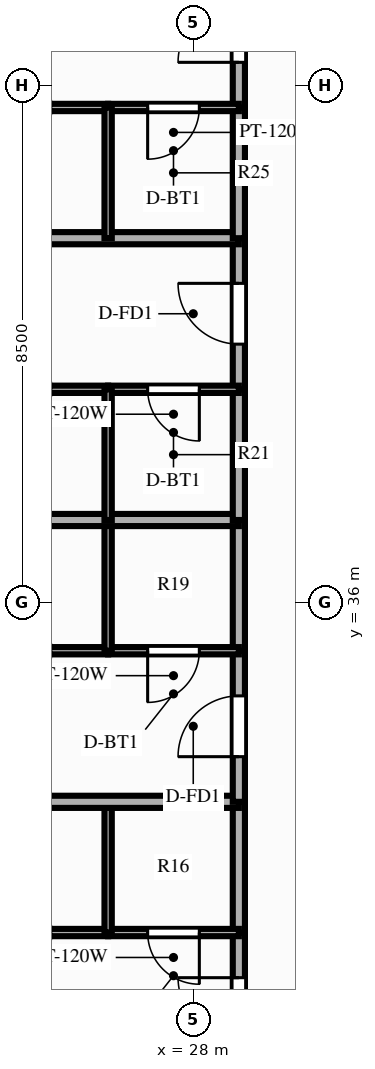
"""IFC4 building model, lengths in metres.
Left out: names, types, materials, properties, quantities, classifications, styles, units other than length and angle.
Written with IfcOpenShell. Run it as: python <this file> out.ifc"""

import sys

from ifc_helpers import new_model, si_unit, direction, frame, frame_2d, origin, place, context, subcontext, project, spatial, rectangle, extrude, source, transform, mapped, element, fill, save


model = new_model("IFC4")
c1 = context("Model", 3, precision=1e-05, world=origin(), true_north=direction((0.0, 1.0)))
c2 = subcontext(c1, "Body", "Model", "MODEL_VIEW")
j1 = project(units=[si_unit("LENGTHUNIT", "METRE"), si_unit("PLANEANGLEUNIT", "RADIAN")], contexts=[c1])
p1 = place(None, origin())
s1 = spatial("IfcSite", under=j1, at=p1, CompositionType="ELEMENT")
p2 = place(p1, origin())
s2 = spatial("IfcBuilding", under=s1, at=p2, CompositionType="ELEMENT")
p3 = place(p2, frame((0.0, 0.0, 122.85)))
s3 = spatial("IfcBuildingStorey", under=s2, at=p3, CompositionType="ELEMENT", Elevation=122.85)
p4 = place(p3, frame((28.75, 28.08, 0.0), z_axis=(0.0, 0.0, 1.0), x_axis=(0.0, 1.0, 0.0)))
e1 = element("IfcWall", 1, at=p4, inside=s3, PredefinedType="PARTITIONING", context=c2, shape_type="SweptSolid", body=[
    extrude(rectangle(XDim=2.485, YDim=0.2, at=frame_2d((1.242, 0.0))), origin(), (0.0, 0.0, 1.0), 3.56),
])
p5 = place(p4, frame((0.742, 0.0, 0.0)))
e2 = element("IfcOpeningElement", 2, at=p5, cuts=e1, PredefinedType="OPENING", context=c2, shape_type="SweptSolid", body=[
    extrude(rectangle(XDim=1.0, YDim=2.15, at=frame_2d((0.5, 1.075))), frame((0.0, 0.112, 0.0), z_axis=(0.0, -1.0, 0.0), x_axis=(1.0, 0.0, 0.0)), (0.0, 0.0, 1.0), 0.224),
])
p6 = place(p3, frame((28.75, 30.565, 0.0), z_axis=(0.0, 0.0, 1.0), x_axis=(0.0, 1.0, 0.0)))
e3 = element("IfcWall", 3, at=p6, inside=s3, PredefinedType="PARTITIONING", context=c2, shape_type="SweptSolid", body=[
    extrude(rectangle(XDim=2.15, YDim=0.2, at=frame_2d((1.075, 0.0))), origin(), (0.0, 0.0, 1.0), 3.56),
])
p7 = place(p3, frame((28.75, 30.565, 0.0), z_axis=(0.0, 0.0, 1.0), x_axis=(-1.0, 0.0, 0.0)))
e4 = element("IfcWall", 4, at=p7, inside=s3, PredefinedType="PARTITIONING", context=c2, shape_type="SweptSolid", body=[
    extrude(rectangle(XDim=2.15, YDim=0.12, at=frame_2d((1.075, 0.0))), origin(), (0.0, 0.0, 1.0), 3.56),
])
p8 = place(p7, frame((0.65, 0.0, 0.0)))
e5 = element("IfcOpeningElement", 5, at=p8, cuts=e4, PredefinedType="OPENING", context=c2, shape_type="SweptSolid", body=[
    extrude(rectangle(XDim=0.85, YDim=2.05, at=frame_2d((0.425, 1.025))), frame((0.0, 0.072, 0.0), z_axis=(0.0, -1.0, 0.0), x_axis=(1.0, 0.0, 0.0)), (0.0, 0.0, 1.0), 0.144),
])
p9 = place(p3, frame((26.6, 30.565, 0.0), z_axis=(0.0, 0.0, 1.0), x_axis=(-1.0, 0.0, 0.0)))
e6 = element("IfcWall", 6, at=p9, inside=s3, PredefinedType="PARTITIONING", context=c2, shape_type="SweptSolid", body=[
    extrude(rectangle(XDim=0.97, YDim=0.12, at=frame_2d((0.485, 0.0))), origin(), (0.0, 0.0, 1.0), 3.56),
])
p10 = place(p3, frame((26.6, 30.565, 0.0), z_axis=(0.0, 0.0, 1.0), x_axis=(0.0, 1.0, 0.0)))
e7 = element("IfcWall", 7, at=p10, inside=s3, PredefinedType="PARTITIONING", context=c2, shape_type="SweptSolid", body=[
    extrude(rectangle(XDim=2.15, YDim=0.12, at=frame_2d((1.075, 0.0))), origin(), (0.0, 0.0, 1.0), 3.56),
])
p11 = place(p3, frame((28.75, 32.715, 0.0), z_axis=(0.0, 0.0, 1.0), x_axis=(-1.0, 0.0, 0.0)))
e8 = element("IfcWall", 8, at=p11, inside=s3, PredefinedType="PARTITIONING", context=c2, shape_type="SweptSolid", body=[
    extrude(rectangle(XDim=16.6, YDim=0.2, at=frame_2d((8.3, 0.0))), origin(), (0.0, 0.0, 1.0), 3.56),
])
p12 = place(p3, frame((28.75, 32.715, 0.0), z_axis=(0.0, 0.0, 1.0), x_axis=(0.0, 1.0, 0.0)))
e9 = element("IfcWall", 9, at=p12, inside=s3, PredefinedType="PARTITIONING", context=c2, shape_type="SweptSolid", body=[
    extrude(rectangle(XDim=2.485, YDim=0.2, at=frame_2d((1.242, 0.0))), origin(), (0.0, 0.0, 1.0), 3.56),
])
p13 = place(p12, frame((0.742, 0.0, 0.0)))
e10 = element("IfcOpeningElement", 10, at=p13, cuts=e9, PredefinedType="OPENING", context=c2, shape_type="SweptSolid", body=[
    extrude(rectangle(XDim=1.0, YDim=2.15, at=frame_2d((0.5, 1.075))), frame((0.0, 0.112, 0.0), z_axis=(0.0, -1.0, 0.0), x_axis=(1.0, 0.0, 0.0)), (0.0, 0.0, 1.0), 0.224),
])
p14 = place(p3, frame((28.75, 35.2, 0.0), z_axis=(0.0, 0.0, 1.0), x_axis=(0.0, 1.0, 0.0)))
e11 = element("IfcWall", 11, at=p14, inside=s3, PredefinedType="PARTITIONING", context=c2, shape_type="SweptSolid", body=[
    extrude(rectangle(XDim=2.15, YDim=0.2, at=frame_2d((1.075, 0.0))), origin(), (0.0, 0.0, 1.0), 3.56),
])
p15 = place(p3, frame((28.75, 35.2, 0.0), z_axis=(0.0, 0.0, 1.0), x_axis=(-1.0, 0.0, 0.0)))
e12 = element("IfcWall", 12, at=p15, inside=s3, PredefinedType="PARTITIONING", context=c2, shape_type="SweptSolid", body=[
    extrude(rectangle(XDim=2.15, YDim=0.12, at=frame_2d((1.075, 0.0))), origin(), (0.0, 0.0, 1.0), 3.56),
])
p16 = place(p15, frame((0.65, 0.0, 0.0)))
e13 = element("IfcOpeningElement", 13, at=p16, cuts=e12, PredefinedType="OPENING", context=c2, shape_type="SweptSolid", body=[
    extrude(rectangle(XDim=0.85, YDim=2.05, at=frame_2d((0.425, 1.025))), frame((0.0, 0.072, 0.0), z_axis=(0.0, -1.0, 0.0), x_axis=(1.0, 0.0, 0.0)), (0.0, 0.0, 1.0), 0.144),
])
p17 = place(p3, frame((26.6, 35.2, 0.0), z_axis=(0.0, 0.0, 1.0), x_axis=(-1.0, 0.0, 0.0)))
e14 = element("IfcWall", 14, at=p17, inside=s3, PredefinedType="PARTITIONING", context=c2, shape_type="SweptSolid", body=[
    extrude(rectangle(XDim=0.97, YDim=0.12, at=frame_2d((0.485, 0.0))), origin(), (0.0, 0.0, 1.0), 3.56),
])
p18 = place(p3, frame((26.6, 35.2, 0.0), z_axis=(0.0, 0.0, 1.0), x_axis=(0.0, 1.0, 0.0)))
e15 = element("IfcWall", 15, at=p18, inside=s3, PredefinedType="PARTITIONING", context=c2, shape_type="SweptSolid", body=[
    extrude(rectangle(XDim=2.15, YDim=0.12, at=frame_2d((1.075, 0.0))), origin(), (0.0, 0.0, 1.0), 3.56),
])
p19 = place(p3, frame((28.75, 37.35, 0.0), z_axis=(0.0, 0.0, 1.0), x_axis=(-1.0, 0.0, 0.0)))
e16 = element("IfcWall", 16, at=p19, inside=s3, PredefinedType="PARTITIONING", context=c2, shape_type="SweptSolid", body=[
    extrude(rectangle(XDim=16.6, YDim=0.2, at=frame_2d((8.3, 0.0))), origin(), (0.0, 0.0, 1.0), 3.56),
])
p20 = place(p3, frame((28.75, 37.35, 0.0), z_axis=(0.0, 0.0, 1.0), x_axis=(0.0, 1.0, 0.0)))
e17 = element("IfcWall", 17, at=p20, inside=s3, PredefinedType="PARTITIONING", context=c2, shape_type="SweptSolid", body=[
    extrude(rectangle(XDim=2.15, YDim=0.2, at=frame_2d((1.075, 0.0))), origin(), (0.0, 0.0, 1.0), 3.56),
])
p21 = place(p3, frame((28.75, 39.5, 0.0), z_axis=(0.0, 0.0, 1.0), x_axis=(0.0, 1.0, 0.0)))
e18 = element("IfcWall", 18, at=p21, inside=s3, PredefinedType="PARTITIONING", context=c2, shape_type="SweptSolid", body=[
    extrude(rectangle(XDim=2.485, YDim=0.2, at=frame_2d((1.243, 0.0))), origin(), (0.0, 0.0, 1.0), 3.56),
])
p22 = place(p21, frame((0.742, 0.0, 0.0)))
e19 = element("IfcOpeningElement", 19, at=p22, cuts=e18, PredefinedType="OPENING", context=c2, shape_type="SweptSolid", body=[
    extrude(rectangle(XDim=1.0, YDim=2.15, at=frame_2d((0.5, 1.075))), frame((0.0, 0.112, 0.0), z_axis=(0.0, -1.0, 0.0), x_axis=(1.0, 0.0, 0.0)), (0.0, 0.0, 1.0), 0.224),
])
p23 = place(p3, frame((28.75, 39.5, 0.0), z_axis=(0.0, 0.0, 1.0), x_axis=(-1.0, 0.0, 0.0)))
e20 = element("IfcWall", 20, at=p23, inside=s3, PredefinedType="PARTITIONING", context=c2, shape_type="SweptSolid", body=[
    extrude(rectangle(XDim=2.15, YDim=0.12, at=frame_2d((1.075, 0.0))), origin(), (0.0, 0.0, 1.0), 3.56),
])
p24 = place(p23, frame((0.65, 0.0, 0.0)))
e21 = element("IfcOpeningElement", 21, at=p24, cuts=e20, PredefinedType="OPENING", context=c2, shape_type="SweptSolid", body=[
    extrude(rectangle(XDim=0.85, YDim=2.05, at=frame_2d((0.425, 1.025))), frame((0.0, 0.072, 0.0), z_axis=(0.0, -1.0, 0.0), x_axis=(1.0, 0.0, 0.0)), (0.0, 0.0, 1.0), 0.144),
])
p25 = place(p3, frame((26.6, 39.5, 0.0), z_axis=(0.0, 0.0, 1.0), x_axis=(-1.0, 0.0, 0.0)))
e22 = element("IfcWall", 22, at=p25, inside=s3, PredefinedType="PARTITIONING", context=c2, shape_type="SweptSolid", body=[
    extrude(rectangle(XDim=0.97, YDim=0.12, at=frame_2d((0.485, 0.0))), origin(), (0.0, 0.0, 1.0), 3.56),
])
p26 = place(p3, frame((26.6, 37.35, 0.0), z_axis=(0.0, 0.0, 1.0), x_axis=(0.0, 1.0, 0.0)))
e23 = element("IfcWall", 23, at=p26, inside=s3, PredefinedType="PARTITIONING", context=c2, shape_type="SweptSolid", body=[
    extrude(rectangle(XDim=2.15, YDim=0.12, at=frame_2d((1.075, 0.0))), origin(), (0.0, 0.0, 1.0), 3.56),
])
p27 = place(p3, frame((28.75, 41.985, 0.0), z_axis=(0.0, 0.0, 1.0), x_axis=(-1.0, 0.0, 0.0)))
e24 = element("IfcWall", 24, at=p27, inside=s3, PredefinedType="PARTITIONING", context=c2, shape_type="SweptSolid", body=[
    extrude(rectangle(XDim=16.6, YDim=0.2, at=frame_2d((8.3, 0.0))), origin(), (0.0, 0.0, 1.0), 3.56),
])
p28 = place(p3, frame((28.75, 41.985, 0.0), z_axis=(0.0, 0.0, 1.0), x_axis=(0.0, 1.0, 0.0)))
e25 = element("IfcWall", 25, at=p28, inside=s3, PredefinedType="PARTITIONING", context=c2, shape_type="SweptSolid", body=[
    extrude(rectangle(XDim=2.15, YDim=0.2, at=frame_2d((1.075, 0.0))), origin(), (0.0, 0.0, 1.0), 3.56),
])
p29 = place(p3, frame((28.75, 44.135, 0.0), z_axis=(0.0, 0.0, 1.0), x_axis=(0.0, 1.0, 0.0)))
e26 = element("IfcWall", 26, at=p29, inside=s3, PredefinedType="PARTITIONING", context=c2, shape_type="SweptSolid", body=[
    extrude(rectangle(XDim=2.485, YDim=0.2, at=frame_2d((1.243, 0.0))), origin(), (0.0, 0.0, 1.0), 3.56),
])
p30 = place(p29, frame((0.742, 0.0, 0.0)))
e27 = element("IfcOpeningElement", 27, at=p30, cuts=e26, PredefinedType="OPENING", context=c2, shape_type="SweptSolid", body=[
    extrude(rectangle(XDim=1.0, YDim=2.15, at=frame_2d((0.5, 1.075))), frame((0.0, 0.112, 0.0), z_axis=(0.0, -1.0, 0.0), x_axis=(1.0, 0.0, 0.0)), (0.0, 0.0, 1.0), 0.224),
])
p31 = place(p3, frame((28.75, 44.135, 0.0), z_axis=(0.0, 0.0, 1.0), x_axis=(-1.0, 0.0, 0.0)))
e28 = element("IfcWall", 28, at=p31, inside=s3, PredefinedType="PARTITIONING", context=c2, shape_type="SweptSolid", body=[
    extrude(rectangle(XDim=2.15, YDim=0.12, at=frame_2d((1.075, 0.0))), origin(), (0.0, 0.0, 1.0), 3.56),
])
p32 = place(p31, frame((0.65, 0.0, 0.0)))
e29 = element("IfcOpeningElement", 29, at=p32, cuts=e28, PredefinedType="OPENING", context=c2, shape_type="SweptSolid", body=[
    extrude(rectangle(XDim=0.85, YDim=2.05, at=frame_2d((0.425, 1.025))), frame((0.0, 0.072, 0.0), z_axis=(0.0, -1.0, 0.0), x_axis=(1.0, 0.0, 0.0)), (0.0, 0.0, 1.0), 0.144),
])
p33 = place(p3, frame((26.6, 44.135, 0.0), z_axis=(0.0, 0.0, 1.0), x_axis=(-1.0, 0.0, 0.0)))
e30 = element("IfcWall", 30, at=p33, inside=s3, PredefinedType="PARTITIONING", context=c2, shape_type="SweptSolid", body=[
    extrude(rectangle(XDim=0.97, YDim=0.12, at=frame_2d((0.485, 0.0))), origin(), (0.0, 0.0, 1.0), 3.56),
])
p34 = place(p3, frame((26.6, 41.985, 0.0), z_axis=(0.0, 0.0, 1.0), x_axis=(0.0, 1.0, 0.0)))
e31 = element("IfcWall", 31, at=p34, inside=s3, PredefinedType="PARTITIONING", context=c2, shape_type="SweptSolid", body=[
    extrude(rectangle(XDim=2.15, YDim=0.12, at=frame_2d((1.075, 0.0))), origin(), (0.0, 0.0, 1.0), 3.56),
])
m1 = source(origin(), c2, "Body", "SweptSolid", [
    extrude(rectangle(XDim=1.0, YDim=2.15, at=frame_2d((0.5, 1.075))), frame((0.0, 0.025, 0.0), z_axis=(0.0, -1.0, 0.0), x_axis=(1.0, 0.0, 0.0)), (0.0, 0.0, 1.0), 0.05),
])
p35 = place(p5, origin())
e32 = element("IfcDoor", 32, at=p35, inside=s3, OperationType="SINGLE_SWING_RIGHT", PredefinedType="DOOR", context=c2, shape_type="MappedRepresentation", body=[
    mapped(m1, transform((0.0, 0.0, 0.0), scale=1.0)),
])
fill(e2, e32)
m2 = source(origin(), c2, "Body", "SweptSolid", [
    extrude(rectangle(XDim=0.85, YDim=2.05, at=frame_2d((0.425, 1.025))), frame((0.0, 0.025, 0.0), z_axis=(0.0, -1.0, 0.0), x_axis=(1.0, 0.0, 0.0)), (0.0, 0.0, 1.0), 0.05),
])
p36 = place(p8, origin())
e33 = element("IfcDoor", 33, at=p36, inside=s3, OperationType="SINGLE_SWING_LEFT", PredefinedType="DOOR", context=c2, shape_type="MappedRepresentation", body=[
    mapped(m2, transform((0.0, 0.0, 0.0), scale=1.0)),
])
fill(e5, e33)
p37 = place(p13, origin())
e34 = element("IfcDoor", 34, at=p37, inside=s3, OperationType="SINGLE_SWING_LEFT", PredefinedType="DOOR", context=c2, shape_type="MappedRepresentation", body=[
    mapped(m1, transform((0.0, 0.0, 0.0), scale=1.0)),
])
fill(e10, e34)
p38 = place(p16, origin())
e35 = element("IfcDoor", 35, at=p38, inside=s3, OperationType="SINGLE_SWING_RIGHT", PredefinedType="DOOR", context=c2, shape_type="MappedRepresentation", body=[
    mapped(m2, transform((0.0, 0.0, 0.0), scale=1.0)),
])
fill(e13, e35)
p39 = place(p22, origin())
e36 = element("IfcDoor", 36, at=p39, inside=s3, OperationType="SINGLE_SWING_RIGHT", PredefinedType="DOOR", context=c2, shape_type="MappedRepresentation", body=[
    mapped(m1, transform((0.0, 0.0, 0.0), scale=1.0)),
])
fill(e19, e36)
p40 = place(p24, origin())
e37 = element("IfcDoor", 37, at=p40, inside=s3, OperationType="SINGLE_SWING_LEFT", PredefinedType="DOOR", context=c2, shape_type="MappedRepresentation", body=[
    mapped(m2, transform((0.0, 0.0, 0.0), scale=1.0)),
])
fill(e21, e37)
p41 = place(p30, origin())
e38 = element("IfcDoor", 38, at=p41, inside=s3, OperationType="SINGLE_SWING_LEFT", PredefinedType="DOOR", context=c2, shape_type="MappedRepresentation", body=[
    mapped(m1, transform((0.0, 0.0, 0.0), scale=1.0)),
])
fill(e27, e38)
p42 = place(p32, origin())
e39 = element("IfcDoor", 39, at=p42, inside=s3, OperationType="SINGLE_SWING_RIGHT", PredefinedType="DOOR", context=c2, shape_type="MappedRepresentation", body=[
    mapped(m2, transform((0.0, 0.0, 0.0), scale=1.0)),
])
fill(e29, e39)
save(model, sys.argv[1])
